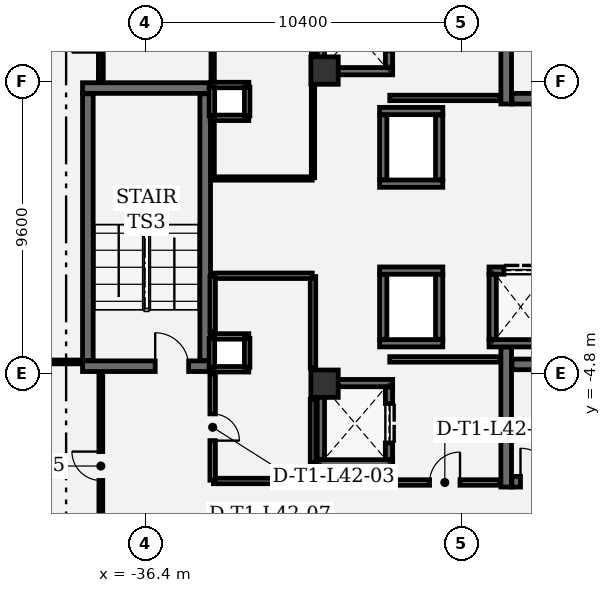
"""IFC4 building model, lengths in metres.
Left out: names, types, materials, properties, quantities, classifications, styles, units other than length and angle.
Written with IfcOpenShell. Run it as: python <this file> out.ifc"""

import sys

from ifc_helpers import new_model, si_unit, direction, frame, frame_2d, origin, origin_2d, place, context, subcontext, project, spatial, rectangle, extrude, element, fill, save


model = new_model("IFC4")
c1 = context("Model", 3, precision=1e-05, world=origin(), true_north=direction((0.0, 1.0)))
c2 = subcontext(c1, "Body", "Model", "MODEL_VIEW")
j1 = project(units=[si_unit("LENGTHUNIT", "METRE"), si_unit("PLANEANGLEUNIT", "RADIAN")], contexts=[c1])
p1 = place(None, origin())
s1 = spatial("IfcSite", under=j1, at=p1, CompositionType="ELEMENT")
p2 = place(p1, origin())
s2 = spatial("IfcBuilding", under=s1, at=p2, CompositionType="ELEMENT")
p3 = place(p2, frame((0.0, 0.0, 184.8)))
s3 = spatial("IfcBuildingStorey", under=s2, at=p3, CompositionType="ELEMENT", Elevation=184.8)
for number, where, z_axis, x_axis in (
    (1, (-30.5, 5.15, 0.0), (0.0, 0.0, 1.0), (1.0, 0.0, 0.0)),
    (2, (-30.5, -5.15, 0.0), (0.0, 0.0, 1.0), (1.0, 0.0, 0.0)),
):
    element("IfcColumn", number, at=place(p3, frame(where, z_axis=z_axis, x_axis=x_axis)), inside=s3, PredefinedType="COLUMN", context=c2, shape_type="SweptSolid", body=[
        extrude(rectangle(XDim=0.9, YDim=0.9, at=origin_2d()), origin(), (0.0, 0.0, 1.0), 4.05),
    ])
p4 = place(p3, frame((-24.525, 8.26, 0.0), z_axis=(0.0, 0.0, 1.0), x_axis=(0.0, -1.0, 0.0)))
e3 = element("IfcWall", 3, at=p4, inside=s3, PredefinedType="SHEAR", context=c2, shape_type="SweptSolid", body=[
    extrude(rectangle(XDim=4.21, YDim=0.35, at=frame_2d((2.105, 0.0))), origin(), (0.0, 0.0, 1.0), 3.78),
])
p5 = place(p3, frame((-24.335, 4.225, 0.0), z_axis=(0.0, 0.0, 1.0), x_axis=(1.0, 0.0, 0.0)))
e4 = element("IfcWall", 4, at=p5, inside=s3, PredefinedType="SHEAR", context=c2, shape_type="SweptSolid", body=[
    extrude(rectangle(XDim=8.12, YDim=0.35, at=frame_2d((4.06, 0.0))), origin(), (0.0, 0.0, 1.0), 3.78),
])
p6 = place(p3, frame((-24.525, -3.94, 0.0), z_axis=(0.0, 0.0, 1.0), x_axis=(0.0, -1.0, 0.0)))
e5 = element("IfcWall", 5, at=p6, inside=s3, PredefinedType="SHEAR", context=c2, shape_type="SweptSolid", body=[
    extrude(rectangle(XDim=4.61, YDim=0.35, at=frame_2d((2.305, 0.0))), origin(), (0.0, 0.0, 1.0), 3.78),
])
p7 = place(p3, frame((-24.335, -8.375, 0.0), z_axis=(0.0, 0.0, 1.0), x_axis=(1.0, 0.0, 0.0)))
e6 = element("IfcWall", 6, at=p7, inside=s3, PredefinedType="SHEAR", context=c2, shape_type="SweptSolid", body=[
    extrude(rectangle(XDim=8.12, YDim=0.35, at=frame_2d((4.06, 0.0))), origin(), (0.0, 0.0, 1.0), 3.78),
])
p8 = place(p7, frame((0.28, 0.0, 0.0)))
e7 = element("IfcOpeningElement", 7, at=p8, cuts=e6, PredefinedType="OPENING", context=c2, shape_type="SweptSolid", body=[
    extrude(rectangle(XDim=1.1, YDim=2.2, at=frame_2d((0.55, 1.1))), frame((0.0, 0.185, 0.0), z_axis=(0.0, -1.0, 0.0), x_axis=(1.0, 0.0, 0.0)), (0.0, 0.0, 1.0), 0.37),
])
p9 = place(p3, frame((-16.215, -4.515, 0.0), z_axis=(0.0, 0.0, 1.0), x_axis=(-1.0, 0.0, 0.0)))
e8 = element("IfcWall", 8, at=p9, inside=s3, PredefinedType="SHEAR", context=c2, shape_type="SweptSolid", body=[
    extrude(rectangle(XDim=8.12, YDim=0.35, at=frame_2d((4.06, 0.0))), origin(), (0.0, 0.0, 1.0), 3.78),
])
p10 = place(p3, frame((-38.46, -4.575, 0.0), z_axis=(0.0, 0.0, 1.0), x_axis=(1.0, 0.0, 0.0)))
e9 = element("IfcWall", 9, at=p10, inside=s3, PredefinedType="SHEAR", context=c2, shape_type="SweptSolid", body=[
    extrude(rectangle(XDim=4.21, YDim=0.35, at=frame_2d((2.105, 0.0))), origin(), (0.0, 0.0, 1.0), 3.78),
])
p11 = place(p10, frame((2.39, 0.0, 0.0)))
e10 = element("IfcOpeningElement", 10, at=p11, cuts=e9, PredefinedType="OPENING", context=c2, shape_type="SweptSolid", body=[
    extrude(rectangle(XDim=1.1, YDim=2.2, at=frame_2d((0.55, 1.1))), frame((0.0, 0.185, 0.0), z_axis=(0.0, -1.0, 0.0), x_axis=(1.0, 0.0, 0.0)), (0.0, 0.0, 1.0), 0.37),
])
p12 = place(p3, frame((-34.25, 4.575, 0.0), z_axis=(0.0, 0.0, 1.0), x_axis=(-1.0, 0.0, 0.0)))
e11 = element("IfcWall", 11, at=p12, inside=s3, PredefinedType="SHEAR", context=c2, shape_type="SweptSolid", body=[
    extrude(rectangle(XDim=4.21, YDim=0.35, at=frame_2d((2.105, 0.0))), origin(), (0.0, 0.0, 1.0), 3.78),
])
for number, where, z_axis, x_axis in (
    (12, (-34.425, -4.385, 0.0), (0.0, 0.0, 1.0), (0.0, 1.0, 0.0)),
    (13, (-38.285, 4.385, 0.0), (0.0, 0.0, 1.0), (0.0, -1.0, 0.0)),
):
    element("IfcWall", number, at=place(p3, frame(where, z_axis=z_axis, x_axis=x_axis)), inside=s3, PredefinedType="SHEAR", context=c2, shape_type="SweptSolid", body=[
        extrude(rectangle(XDim=8.77, YDim=0.35, at=frame_2d((4.385, 0.0))), origin(), (0.0, 0.0, 1.0), 3.78),
    ])
p13 = place(p3, frame((-28.26, 5.13, 0.0), z_axis=(0.0, 0.0, 1.0), x_axis=(-1.0, 0.0, 0.0)))
e14 = element("IfcWall", 14, at=p13, inside=s3, PredefinedType="SHEAR", context=c2, shape_type="SweptSolid", body=[
    extrude(rectangle(XDim=2.48, YDim=0.24, at=frame_2d((1.24, 0.0))), origin(), (0.0, 0.0, 1.0), 3.78),
])
p14 = place(p3, frame((-30.62, 5.262, 0.0), z_axis=(0.0, 0.0, 1.0), x_axis=(0.0, 1.0, 0.0)))
e15 = element("IfcWall", 15, at=p14, inside=s3, PredefinedType="SHEAR", context=c2, shape_type="SweptSolid", body=[
    extrude(rectangle(XDim=2.376, YDim=0.24, at=frame_2d((1.188, 0.0))), origin(), (0.0, 0.0, 1.0), 3.78),
])
p15 = place(p3, frame((-28.38, 7.638, 0.0), z_axis=(0.0, 0.0, 1.0), x_axis=(0.0, -1.0, 0.0)))
e16 = element("IfcWall", 16, at=p15, inside=s3, PredefinedType="SHEAR", context=c2, shape_type="SweptSolid", body=[
    extrude(rectangle(XDim=2.376, YDim=0.24, at=frame_2d((1.188, 0.0))), origin(), (0.0, 0.0, 1.0), 3.78),
])
p16 = place(p15, frame((0.538, 0.0, 0.0)))
e17 = element("IfcOpeningElement", 17, at=p16, cuts=e16, PredefinedType="OPENING", context=c2, shape_type="SweptSolid", body=[
    extrude(rectangle(XDim=1.3, YDim=2.3, at=frame_2d((0.65, 1.15))), frame((0.0, 0.13, 0.0), z_axis=(0.0, -1.0, 0.0), x_axis=(1.0, 0.0, 0.0)), (0.0, 0.0, 1.0), 0.26),
])
for number, where, z_axis, x_axis in (
    (18, (-28.26, -7.77, 0.0), (0.0, 0.0, 1.0), (-1.0, 0.0, 0.0)),
    (19, (-30.74, -5.13, 0.0), (0.0, 0.0, 1.0), (1.0, 0.0, 0.0)),
):
    element("IfcWall", number, at=place(p3, frame(where, z_axis=z_axis, x_axis=x_axis)), inside=s3, PredefinedType="SHEAR", context=c2, shape_type="SweptSolid", body=[
        extrude(rectangle(XDim=2.48, YDim=0.24, at=frame_2d((1.24, 0.0))), origin(), (0.0, 0.0, 1.0), 3.78),
    ])
p17 = place(p3, frame((-30.62, -7.638, 0.0), z_axis=(0.0, 0.0, 1.0), x_axis=(0.0, 1.0, 0.0)))
e20 = element("IfcWall", 20, at=p17, inside=s3, PredefinedType="SHEAR", context=c2, shape_type="SweptSolid", body=[
    extrude(rectangle(XDim=2.376, YDim=0.24, at=frame_2d((1.188, 0.0))), origin(), (0.0, 0.0, 1.0), 3.78),
])
p18 = place(p3, frame((-28.38, -5.262, 0.0), z_axis=(0.0, 0.0, 1.0), x_axis=(0.0, -1.0, 0.0)))
e21 = element("IfcWall", 21, at=p18, inside=s3, PredefinedType="SHEAR", context=c2, shape_type="SweptSolid", body=[
    extrude(rectangle(XDim=2.376, YDim=0.24, at=frame_2d((1.188, 0.0))), origin(), (0.0, 0.0, 1.0), 3.78),
])
p19 = place(p18, frame((0.538, 0.0, 0.0)))
e22 = element("IfcOpeningElement", 22, at=p19, cuts=e21, PredefinedType="OPENING", context=c2, shape_type="SweptSolid", body=[
    extrude(rectangle(XDim=1.3, YDim=2.3, at=frame_2d((0.65, 1.15))), frame((0.0, 0.13, 0.0), z_axis=(0.0, -1.0, 0.0), x_axis=(1.0, 0.0, 0.0)), (0.0, 0.0, 1.0), 0.26),
])
for number, where, z_axis, x_axis in (
    (23, (-26.61, 1.43, 0.0), (0.0, 0.0, 1.0), (-1.0, 0.0, 0.0)),
    (24, (-28.69, 3.82, 0.0), (0.0, 0.0, 1.0), (1.0, 0.0, 0.0)),
):
    element("IfcWall", number, at=place(p3, frame(where, z_axis=z_axis, x_axis=x_axis)), inside=s3, PredefinedType="SHEAR", context=c2, shape_type="SweptSolid", body=[
        extrude(rectangle(XDim=2.08, YDim=0.24, at=frame_2d((1.04, 0.0))), origin(), (0.0, 0.0, 1.0), 3.78),
    ])
for number, where, z_axis, x_axis in (
    (25, (-28.57, 1.562, 0.0), (0.0, 0.0, 1.0), (0.0, 1.0, 0.0)),
    (26, (-26.73, 3.688, 0.0), (0.0, 0.0, 1.0), (0.0, -1.0, 0.0)),
):
    element("IfcWall", number, at=place(p3, frame(where, z_axis=z_axis, x_axis=x_axis)), inside=s3, PredefinedType="SHEAR", context=c2, shape_type="SweptSolid", body=[
        extrude(rectangle(XDim=2.126, YDim=0.24, at=frame_2d((1.063, 0.0))), origin(), (0.0, 0.0, 1.0), 3.78),
    ])
for number, where, z_axis, x_axis in (
    (27, (-26.61, -3.82, 0.0), (0.0, 0.0, 1.0), (-1.0, 0.0, 0.0)),
    (28, (-28.69, -1.43, 0.0), (0.0, 0.0, 1.0), (1.0, 0.0, 0.0)),
):
    element("IfcWall", number, at=place(p3, frame(where, z_axis=z_axis, x_axis=x_axis)), inside=s3, PredefinedType="SHEAR", context=c2, shape_type="SweptSolid", body=[
        extrude(rectangle(XDim=2.08, YDim=0.24, at=frame_2d((1.04, 0.0))), origin(), (0.0, 0.0, 1.0), 3.78),
    ])
for number, where, z_axis, x_axis in (
    (29, (-28.57, -3.688, 0.0), (0.0, 0.0, 1.0), (0.0, 1.0, 0.0)),
    (30, (-26.73, -1.562, 0.0), (0.0, 0.0, 1.0), (0.0, -1.0, 0.0)),
):
    element("IfcWall", number, at=place(p3, frame(where, z_axis=z_axis, x_axis=x_axis)), inside=s3, PredefinedType="SHEAR", context=c2, shape_type="SweptSolid", body=[
        extrude(rectangle(XDim=2.126, YDim=0.24, at=frame_2d((1.063, 0.0))), origin(), (0.0, 0.0, 1.0), 3.78),
    ])
p20 = place(p3, frame((-23.01, -3.82, 0.0), z_axis=(0.0, 0.0, 1.0), x_axis=(-1.0, 0.0, 0.0)))
e31 = element("IfcWall", 31, at=p20, inside=s3, PredefinedType="SHEAR", context=c2, shape_type="SweptSolid", body=[
    extrude(rectangle(XDim=2.08, YDim=0.24, at=frame_2d((1.04, 0.0))), origin(), (0.0, 0.0, 1.0), 3.78),
])
p21 = place(p3, frame((-25.09, -1.43, 0.0), z_axis=(0.0, 0.0, 1.0), x_axis=(1.0, 0.0, 0.0)))
e32 = element("IfcWall", 32, at=p21, inside=s3, PredefinedType="SHEAR", context=c2, shape_type="SweptSolid", body=[
    extrude(rectangle(XDim=2.08, YDim=0.24, at=frame_2d((1.04, 0.0))), origin(), (0.0, 0.0, 1.0), 3.78),
])
p22 = place(p21, frame((0.49, 0.0, 0.0)))
e33 = element("IfcOpeningElement", 33, at=p22, cuts=e32, PredefinedType="OPENING", context=c2, shape_type="SweptSolid", body=[
    extrude(rectangle(XDim=1.1, YDim=2.2, at=frame_2d((0.55, 1.1))), frame((0.0, 0.13, 0.0), z_axis=(0.0, -1.0, 0.0), x_axis=(1.0, 0.0, 0.0)), (0.0, 0.0, 1.0), 0.26),
])
p23 = place(p3, frame((-24.97, -3.688, 0.0), z_axis=(0.0, 0.0, 1.0), x_axis=(0.0, 1.0, 0.0)))
e34 = element("IfcWall", 34, at=p23, inside=s3, PredefinedType="SHEAR", context=c2, shape_type="SweptSolid", body=[
    extrude(rectangle(XDim=2.126, YDim=0.24, at=frame_2d((1.063, 0.0))), origin(), (0.0, 0.0, 1.0), 3.78),
])
for number, where, z_axis, x_axis in (
    (35, (-32.99, 3.595, 0.0), (0.0, 0.0, 1.0), (-1.0, 0.0, 0.0)),
    (36, (-34.26, 4.675, 0.0), (0.0, 0.0, 1.0), (1.0, 0.0, 0.0)),
):
    element("IfcWall", number, at=place(p3, frame(where, z_axis=z_axis, x_axis=x_axis)), inside=s3, PredefinedType="PARTITIONING", context=c2, shape_type="SweptSolid", body=[
        extrude(rectangle(XDim=1.27, YDim=0.18, at=frame_2d((0.635, 0.0))), origin(), (0.0, 0.0, 1.0), 3.78),
    ])
for number, where, z_axis, x_axis in (
    (37, (-34.205, 3.66, 0.0), (0.0, 0.0, 1.0), (0.0, 1.0, 0.0)),
    (38, (-33.045, 4.61, 0.0), (0.0, 0.0, 1.0), (0.0, -1.0, 0.0)),
):
    element("IfcWall", number, at=place(p3, frame(where, z_axis=z_axis, x_axis=x_axis)), inside=s3, PredefinedType="PARTITIONING", context=c2, shape_type="SweptSolid", body=[
        extrude(rectangle(XDim=0.95, YDim=0.18, at=frame_2d((0.475, 0.0))), origin(), (0.0, 0.0, 1.0), 3.78),
    ])
for number, where, z_axis, x_axis in (
    (39, (-32.99, -4.675, 0.0), (0.0, 0.0, 1.0), (-1.0, 0.0, 0.0)),
    (40, (-34.26, -3.595, 0.0), (0.0, 0.0, 1.0), (1.0, 0.0, 0.0)),
):
    element("IfcWall", number, at=place(p3, frame(where, z_axis=z_axis, x_axis=x_axis)), inside=s3, PredefinedType="PARTITIONING", context=c2, shape_type="SweptSolid", body=[
        extrude(rectangle(XDim=1.27, YDim=0.18, at=frame_2d((0.635, 0.0))), origin(), (0.0, 0.0, 1.0), 3.78),
    ])
for number, where, z_axis, x_axis in (
    (41, (-34.205, -4.61, 0.0), (0.0, 0.0, 1.0), (0.0, 1.0, 0.0)),
    (42, (-33.045, -3.66, 0.0), (0.0, 0.0, 1.0), (0.0, -1.0, 0.0)),
):
    element("IfcWall", number, at=place(p3, frame(where, z_axis=z_axis, x_axis=x_axis)), inside=s3, PredefinedType="PARTITIONING", context=c2, shape_type="SweptSolid", body=[
        extrude(rectangle(XDim=0.95, YDim=0.18, at=frame_2d((0.475, 0.0))), origin(), (0.0, 0.0, 1.0), 3.78),
    ])
p24 = place(p3, frame((-28.355, 4.25, 0.0), z_axis=(0.0, 0.0, 1.0), x_axis=(1.0, 0.0, 0.0)))
e43 = element("IfcWall", 43, at=p24, inside=s3, PredefinedType="PARTITIONING", context=c2, shape_type="SweptSolid", body=[
    extrude(rectangle(XDim=3.622, YDim=0.18, at=frame_2d((1.811, 0.0))), origin(), (0.0, 0.0, 1.0), 3.78),
])
p25 = place(p3, frame((-28.355, -8.4, 0.0), z_axis=(0.0, 0.0, 1.0), x_axis=(1.0, 0.0, 0.0)))
e44 = element("IfcWall", 44, at=p25, inside=s3, PredefinedType="PARTITIONING", context=c2, shape_type="SweptSolid", body=[
    extrude(rectangle(XDim=3.622, YDim=0.18, at=frame_2d((1.811, 0.0))), origin(), (0.0, 0.0, 1.0), 3.78),
])
p26 = place(p25, frame((1.311, 0.0, 0.0)))
e45 = element("IfcOpeningElement", 45, at=p26, cuts=e44, PredefinedType="OPENING", context=c2, shape_type="SweptSolid", body=[
    extrude(rectangle(XDim=1.0, YDim=2.15, at=frame_2d((0.5, 1.075))), frame((0.0, 0.1, 0.0), z_axis=(0.0, -1.0, 0.0), x_axis=(1.0, 0.0, 0.0)), (0.0, 0.0, 1.0), 0.2),
])
p27 = place(p3, frame((-24.733, -4.35, 0.0), z_axis=(0.0, 0.0, 1.0), x_axis=(-1.0, 0.0, 0.0)))
e46 = element("IfcWall", 46, at=p27, inside=s3, PredefinedType="PARTITIONING", context=c2, shape_type="SweptSolid", body=[
    extrude(rectangle(XDim=3.622, YDim=0.18, at=frame_2d((1.811, 0.0))), origin(), (0.0, 0.0, 1.0), 3.78),
])
p28 = place(p3, frame((-34.155, 1.6, 0.0), z_axis=(0.0, 0.0, 1.0), x_axis=(1.0, 0.0, 0.0)))
e47 = element("IfcWall", 47, at=p28, inside=s3, PredefinedType="PARTITIONING", context=c2, shape_type="SweptSolid", body=[
    extrude(rectangle(XDim=3.25, YDim=0.11, at=frame_2d((1.625, 0.0))), origin(), (0.0, 0.0, 1.0), 3.78),
])
p29 = place(p3, frame((-30.88, 1.625, 0.0), z_axis=(0.0, 0.0, 1.0), x_axis=(0.0, 1.0, 0.0)))
e48 = element("IfcWall", 48, at=p29, inside=s3, PredefinedType="PARTITIONING", context=c2, shape_type="SweptSolid", body=[
    extrude(rectangle(XDim=3.01, YDim=0.11, at=frame_2d((1.505, 0.0))), origin(), (0.0, 0.0, 1.0), 3.78),
])
p30 = place(p3, frame((-30.88, 5.665, 0.0), z_axis=(0.0, 0.0, 1.0), x_axis=(0.0, 1.0, 0.0)))
e49 = element("IfcWall", 49, at=p30, inside=s3, PredefinedType="PARTITIONING", context=c2, shape_type="SweptSolid", body=[
    extrude(rectangle(XDim=2.078, YDim=0.11, at=frame_2d((1.039, 0.0))), origin(), (0.0, 0.0, 1.0), 3.78),
])
p31 = place(p3, frame((-34.18, 8.225, 0.0), z_axis=(0.0, 0.0, 1.0), x_axis=(0.0, -1.0, 0.0)))
e50 = element("IfcWall", 50, at=p31, inside=s3, PredefinedType="PARTITIONING", context=c2, shape_type="SweptSolid", body=[
    extrude(rectangle(XDim=3.385, YDim=0.11, at=frame_2d((1.692, 0.0))), origin(), (0.0, 0.0, 1.0), 3.78),
])
p32 = place(p31, frame((1.252, 0.0, 0.0)))
e51 = element("IfcOpeningElement", 51, at=p32, cuts=e50, PredefinedType="OPENING", context=c2, shape_type="SweptSolid", body=[
    extrude(rectangle(XDim=0.88, YDim=2.1, at=frame_2d((0.44, 1.05))), frame((0.0, 0.065, 0.0), z_axis=(0.0, -1.0, 0.0), x_axis=(1.0, 0.0, 0.0)), (0.0, 0.0, 1.0), 0.13),
])
p33 = place(p3, frame((-34.18, 3.43, 0.0), z_axis=(0.0, 0.0, 1.0), x_axis=(0.0, -1.0, 0.0)))
e52 = element("IfcWall", 52, at=p33, inside=s3, PredefinedType="PARTITIONING", context=c2, shape_type="SweptSolid", body=[
    extrude(rectangle(XDim=1.805, YDim=0.11, at=frame_2d((0.902, 0.0))), origin(), (0.0, 0.0, 1.0), 3.78),
])
p34 = place(p3, frame((-34.155, -8.35, 0.0), z_axis=(0.0, 0.0, 1.0), x_axis=(1.0, 0.0, 0.0)))
e53 = element("IfcWall", 53, at=p34, inside=s3, PredefinedType="PARTITIONING", context=c2, shape_type="SweptSolid", body=[
    extrude(rectangle(XDim=3.25, YDim=0.18, at=frame_2d((1.625, 0.0))), origin(), (0.0, 0.0, 1.0), 3.344),
])
p35 = place(p3, frame((-30.88, -7.743, 0.0), z_axis=(0.0, 0.0, 1.0), x_axis=(0.0, 1.0, 0.0)))
e54 = element("IfcWall", 54, at=p35, inside=s3, PredefinedType="PARTITIONING", context=c2, shape_type="SweptSolid", body=[
    extrude(rectangle(XDim=2.078, YDim=0.18, at=frame_2d((1.039, 0.0))), origin(), (0.0, 0.0, 1.0), 3.78),
])
p36 = place(p3, frame((-30.88, -4.635, 0.0), z_axis=(0.0, 0.0, 1.0), x_axis=(0.0, 1.0, 0.0)))
e55 = element("IfcWall", 55, at=p36, inside=s3, PredefinedType="PARTITIONING", context=c2, shape_type="SweptSolid", body=[
    extrude(rectangle(XDim=3.01, YDim=0.18, at=frame_2d((1.505, 0.0))), origin(), (0.0, 0.0, 1.0), 3.78),
])
p37 = place(p3, frame((-30.905, -1.6, 0.0), z_axis=(0.0, 0.0, 1.0), x_axis=(-1.0, 0.0, 0.0)))
e56 = element("IfcWall", 56, at=p37, inside=s3, PredefinedType="PARTITIONING", context=c2, shape_type="SweptSolid", body=[
    extrude(rectangle(XDim=3.25, YDim=0.18, at=frame_2d((1.625, 0.0))), origin(), (0.0, 0.0, 1.0), 3.78),
])
p38 = place(p3, frame((-34.18, -1.625, 0.0), z_axis=(0.0, 0.0, 1.0), x_axis=(0.0, -1.0, 0.0)))
e57 = element("IfcWall", 57, at=p38, inside=s3, PredefinedType="PARTITIONING", context=c2, shape_type="SweptSolid", body=[
    extrude(rectangle(XDim=1.805, YDim=0.18, at=frame_2d((0.902, 0.0))), origin(), (0.0, 0.0, 1.0), 3.78),
])
p39 = place(p3, frame((-34.18, -4.84, 0.0), z_axis=(0.0, 0.0, 1.0), x_axis=(0.0, -1.0, 0.0)))
e58 = element("IfcWall", 58, at=p39, inside=s3, PredefinedType="PARTITIONING", context=c2, shape_type="SweptSolid", body=[
    extrude(rectangle(XDim=3.485, YDim=0.18, at=frame_2d((1.743, 0.0))), origin(), (0.0, 0.0, 1.0), 3.78),
])
p40 = place(p39, frame((1.302, 0.0, 0.0)))
e59 = element("IfcOpeningElement", 59, at=p40, cuts=e58, PredefinedType="OPENING", context=c2, shape_type="SweptSolid", body=[
    extrude(rectangle(XDim=0.88, YDim=2.1, at=frame_2d((0.44, 1.05))), frame((0.0, 0.1, 0.0), z_axis=(0.0, -1.0, 0.0), x_axis=(1.0, 0.0, 0.0)), (0.0, 0.0, 1.0), 0.2),
])
p41 = place(p3, frame((-37.858, -10.933, 0.0), z_axis=(0.0, 0.0, 1.0), x_axis=(0.0, 1.0, 0.0)))
e60 = element("IfcWall", 60, at=p41, inside=s3, PredefinedType="PARTITIONING", context=c2, shape_type="SweptSolid", body=[
    extrude(rectangle(XDim=6.15, YDim=0.125, at=frame_2d((3.075, 0.0))), origin(), (0.0, 0.0, 1.0), 3.78),
])
p42 = place(p41, frame((2.6, 0.0, 0.0)))
e61 = element("IfcOpeningElement", 61, at=p42, cuts=e60, PredefinedType="OPENING", context=c2, shape_type="SweptSolid", body=[
    extrude(rectangle(XDim=0.95, YDim=2.15, at=frame_2d((0.475, 1.075))), frame((0.0, 0.073, 0.0), z_axis=(0.0, -1.0, 0.0), x_axis=(1.0, 0.0, 0.0)), (0.0, 0.0, 1.0), 0.145),
])
p43 = place(p3, frame((-38.493, -4.434, 0.0), z_axis=(0.0, 0.0, 1.0), x_axis=(-1.0, 0.0, 0.0)))
e62 = element("IfcWall", 62, at=p43, inside=s3, PredefinedType="PARTITIONING", context=c2, shape_type="SweptSolid", body=[
    extrude(rectangle(XDim=15.355, YDim=0.125, at=frame_2d((7.678, 0.0))), origin(), (0.0, 0.0, 1.0), 2.9),
])
p44 = place(p3, frame((-37.858, 4.783, 0.0), z_axis=(0.0, 0.0, 1.0), x_axis=(0.0, 1.0, 0.0)))
e63 = element("IfcWall", 63, at=p44, inside=s3, PredefinedType="PARTITIONING", context=c2, shape_type="SweptSolid", body=[
    extrude(rectangle(XDim=2.872, YDim=0.16, at=frame_2d((1.436, 0.0))), origin(), (0.0, 0.0, 1.0), 3.78),
])
p45 = place(p44, frame((0.961, 0.0, 0.0)))
e64 = element("IfcOpeningElement", 64, at=p45, cuts=e63, PredefinedType="OPENING", context=c2, shape_type="SweptSolid", body=[
    extrude(rectangle(XDim=0.95, YDim=2.15, at=frame_2d((0.475, 1.075))), frame((0.0, 0.09, 0.0), z_axis=(0.0, -1.0, 0.0), x_axis=(1.0, 0.0, 0.0)), (0.0, 0.0, 1.0), 0.18),
])
p46 = place(p8, origin())
e65 = element("IfcDoor", 65, at=p46, inside=s3, OperationType="SINGLE_SWING_LEFT", PredefinedType="DOOR", context=c2, shape_type="SweptSolid", body=[
    extrude(rectangle(XDim=1.1, YDim=2.2, at=frame_2d((0.55, 1.1))), frame((0.0, 0.025, 0.0), z_axis=(0.0, -1.0, 0.0), x_axis=(1.0, 0.0, 0.0)), (0.0, 0.0, 1.0), 0.05),
])
fill(e7, e65)
p47 = place(p11, origin())
e66 = element("IfcDoor", 66, at=p47, inside=s3, OperationType="SINGLE_SWING_LEFT", PredefinedType="DOOR", context=c2, shape_type="SweptSolid", body=[
    extrude(rectangle(XDim=1.1, YDim=2.2, at=frame_2d((0.55, 1.1))), frame((0.0, 0.025, 0.0), z_axis=(0.0, -1.0, 0.0), x_axis=(1.0, 0.0, 0.0)), (0.0, 0.0, 1.0), 0.05),
])
fill(e10, e66)
p48 = place(p19, origin())
e67 = element("IfcDoor", 67, at=p48, inside=s3, OperationType="DOUBLE_DOOR_SLIDING", PredefinedType="DOOR", context=c2, shape_type="SweptSolid", body=[
    extrude(rectangle(XDim=1.3, YDim=2.3, at=frame_2d((0.65, 1.15))), frame((0.0, 0.025, 0.0), z_axis=(0.0, -1.0, 0.0), x_axis=(1.0, 0.0, 0.0)), (0.0, 0.0, 1.0), 0.05),
])
fill(e22, e67)
p49 = place(p22, origin())
e68 = element("IfcDoor", 68, at=p49, inside=s3, OperationType="DOUBLE_DOOR_SLIDING", PredefinedType="DOOR", context=c2, shape_type="SweptSolid", body=[
    extrude(rectangle(XDim=1.1, YDim=2.2, at=frame_2d((0.55, 1.1))), frame((0.0, 0.025, 0.0), z_axis=(0.0, -1.0, 0.0), x_axis=(1.0, 0.0, 0.0)), (0.0, 0.0, 1.0), 0.05),
])
fill(e33, e68)
p50 = place(p40, origin())
e69 = element("IfcDoor", 69, at=p50, inside=s3, OperationType="SINGLE_SWING_RIGHT", PredefinedType="DOOR", context=c2, shape_type="SweptSolid", body=[
    extrude(rectangle(XDim=0.88, YDim=2.1, at=frame_2d((0.44, 1.05))), frame((0.0, 0.025, 0.0), z_axis=(0.0, -1.0, 0.0), x_axis=(1.0, 0.0, 0.0)), (0.0, 0.0, 1.0), 0.05),
])
fill(e59, e69)
p51 = place(p42, origin())
e70 = element("IfcDoor", 70, at=p51, inside=s3, OperationType="SINGLE_SWING_RIGHT", PredefinedType="DOOR", context=c2, shape_type="SweptSolid", body=[
    extrude(rectangle(XDim=0.95, YDim=2.15, at=frame_2d((0.475, 1.075))), frame((0.0, 0.025, 0.0), z_axis=(0.0, -1.0, 0.0), x_axis=(1.0, 0.0, 0.0)), (0.0, 0.0, 1.0), 0.05),
])
fill(e61, e70)
p52 = place(p45, origin())
e71 = element("IfcDoor", 71, at=p52, inside=s3, OperationType="SINGLE_SWING_LEFT", PredefinedType="DOOR", context=c2, shape_type="SweptSolid", body=[
    extrude(rectangle(XDim=0.95, YDim=2.15, at=frame_2d((0.475, 1.075))), frame((0.0, 0.025, 0.0), z_axis=(0.0, -1.0, 0.0), x_axis=(1.0, 0.0, 0.0)), (0.0, 0.0, 1.0), 0.05),
])
fill(e64, e71)
p53 = place(p26, origin())
e72 = element("IfcDoor", 72, at=p53, inside=s3, OperationType="SINGLE_SWING_RIGHT", PredefinedType="DOOR", context=c2, shape_type="SweptSolid", body=[
    extrude(rectangle(XDim=1.0, YDim=2.15, at=frame_2d((0.5, 1.075))), frame((0.0, 0.025, 0.0), z_axis=(0.0, -1.0, 0.0), x_axis=(1.0, 0.0, 0.0)), (0.0, 0.0, 1.0), 0.05),
])
fill(e45, e72)
save(model, sys.argv[1])
